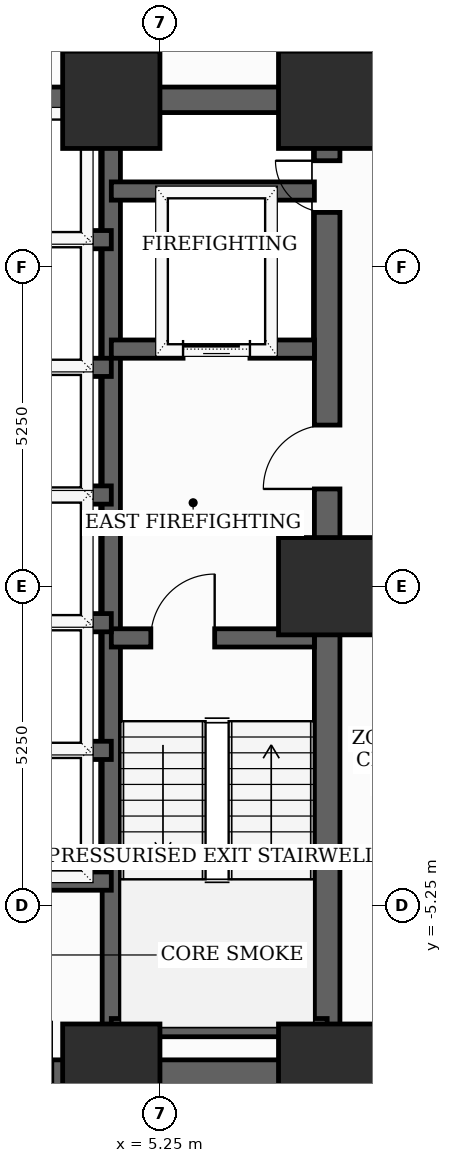
"""IFC4 building model, lengths in metres.
Left out: names, types, materials, properties, quantities, classifications, styles, units other than length and angle.
Written with IfcOpenShell. Run it as: python <this file> out.ifc"""

import sys

from ifc_helpers import new_model, si_unit, direction, frame, frame_2d, origin, origin_2d, place, context, subcontext, project, spatial, rectangle, extrude, element, fill, save


model = new_model("IFC4")
c1 = context("Model", 3, precision=1e-05, world=origin(), true_north=direction((0.0, 1.0)))
c2 = subcontext(c1, "Body", "Model", "MODEL_VIEW")
j1 = project(units=[si_unit("LENGTHUNIT", "METRE"), si_unit("PLANEANGLEUNIT", "RADIAN")], contexts=[c1])
p1 = place(None, origin())
s1 = spatial("IfcSite", under=j1, at=p1, CompositionType="ELEMENT")
p2 = place(p1, origin())
s2 = spatial("IfcBuilding", under=s1, at=p2, CompositionType="ELEMENT")
p3 = place(p2, frame((0.0, 0.0, 81.5)))
s3 = spatial("IfcBuildingStorey", under=s2, at=p3, CompositionType="ELEMENT", Elevation=81.5)
for number, where, z_axis, x_axis in (
    (1, (4.45, -8.0, 0.0), (0.0, 0.0, 1.0), (1.0, 0.0, 0.0)),
    (2, (8.0, -8.0, 0.0), (0.0, 0.0, 1.0), (1.0, 0.0, 0.0)),
    (3, (8.0, 0.0, 0.0), (0.0, 0.0, 1.0), (1.0, 0.0, 0.0)),
    (4, (8.0, 8.0, 0.0), (0.0, 0.0, 1.0), (1.0, 0.0, 0.0)),
    (5, (4.45, 8.0, 0.0), (0.0, 0.0, 1.0), (1.0, 0.0, 0.0)),
):
    element("IfcColumn", number, at=place(p3, frame(where, z_axis=z_axis, x_axis=x_axis)), inside=s3, PredefinedType="COLUMN", context=c2, shape_type="SweptSolid", body=[
        extrude(rectangle(XDim=1.6, YDim=1.6, at=origin_2d()), origin(), (0.0, 0.0, 1.0), 3.7),
    ])
p4 = place(p3, frame((8.0, -8.0, 0.0), z_axis=(0.0, 0.0, 1.0), x_axis=(0.0, 1.0, 0.0)))
e6 = element("IfcWall", 6, at=p4, inside=s3, PredefinedType="SHEAR", context=c2, shape_type="SweptSolid", body=[
    extrude(rectangle(XDim=16.0, YDim=0.42, at=frame_2d((8.0, 0.0))), origin(), (0.0, 0.0, 1.0), 3.46),
])
p5 = place(p4, frame((9.6, 0.0, 0.0)))
e7 = element("IfcOpeningElement", 7, at=p5, cuts=e6, PredefinedType="OPENING", context=c2, shape_type="SweptSolid", body=[
    extrude(rectangle(XDim=1.05, YDim=2.15, at=frame_2d((0.525, 1.075))), frame((0.0, 0.22, 0.0), z_axis=(0.0, -1.0, 0.0), x_axis=(1.0, 0.0, 0.0)), (0.0, 0.0, 1.0), 0.44),
])
p6 = place(p4, frame((14.148, 0.0, 0.0)))
e8 = element("IfcOpeningElement", 8, at=p6, cuts=e6, PredefinedType="OPENING", context=c2, shape_type="SweptSolid", body=[
    extrude(rectangle(XDim=0.85, YDim=2.02, at=frame_2d((0.425, 1.01))), frame((0.0, 0.22, 0.0), z_axis=(0.0, -1.0, 0.0), x_axis=(1.0, 0.0, 0.0)), (0.0, 0.0, 1.0), 0.44),
])
p7 = place(p3, frame((-8.0, -8.0, 0.0), z_axis=(0.0, 0.0, 1.0), x_axis=(1.0, 0.0, 0.0)))
e9 = element("IfcWall", 9, at=p7, inside=s3, PredefinedType="SHEAR", context=c2, shape_type="SweptSolid", body=[
    extrude(rectangle(XDim=16.0, YDim=0.42, at=frame_2d((8.0, 0.0))), origin(), (0.0, 0.0, 1.0), 3.46),
])
p8 = place(p7, frame((4.529, 0.0, 0.0)))
e10 = element("IfcOpeningElement", 10, at=p8, cuts=e9, PredefinedType="OPENING", context=c2, shape_type="SweptSolid", body=[
    extrude(rectangle(XDim=0.85, YDim=2.02, at=frame_2d((0.425, 1.01))), frame((0.0, 0.22, 0.0), z_axis=(0.0, -1.0, 0.0), x_axis=(1.0, 0.0, 0.0)), (0.0, 0.0, 1.0), 0.44),
])
p9 = place(p7, frame((6.49, 0.0, 0.0)))
e11 = element("IfcOpeningElement", 11, at=p9, cuts=e9, PredefinedType="OPENING", context=c2, shape_type="SweptSolid", body=[
    extrude(rectangle(XDim=0.85, YDim=2.02, at=frame_2d((0.425, 1.01))), frame((0.0, 0.22, 0.0), z_axis=(0.0, -1.0, 0.0), x_axis=(1.0, 0.0, 0.0)), (0.0, 0.0, 1.0), 0.44),
])
p10 = place(p7, frame((8.69, 0.0, 0.0)))
e12 = element("IfcOpeningElement", 12, at=p10, cuts=e9, PredefinedType="OPENING", context=c2, shape_type="SweptSolid", body=[
    extrude(rectangle(XDim=0.85, YDim=2.02, at=frame_2d((0.425, 1.01))), frame((0.0, 0.22, 0.0), z_axis=(0.0, -1.0, 0.0), x_axis=(1.0, 0.0, 0.0)), (0.0, 0.0, 1.0), 0.44),
])
p11 = place(p7, frame((10.621, 0.0, 0.0)))
e13 = element("IfcOpeningElement", 13, at=p11, cuts=e9, PredefinedType="OPENING", context=c2, shape_type="SweptSolid", body=[
    extrude(rectangle(XDim=0.85, YDim=2.02, at=frame_2d((0.425, 1.01))), frame((0.0, 0.22, 0.0), z_axis=(0.0, -1.0, 0.0), x_axis=(1.0, 0.0, 0.0)), (0.0, 0.0, 1.0), 0.44),
])
p12 = place(p3, frame((-8.0, 8.0, 0.0), z_axis=(0.0, 0.0, 1.0), x_axis=(1.0, 0.0, 0.0)))
e14 = element("IfcWall", 14, at=p12, inside=s3, PredefinedType="SHEAR", context=c2, shape_type="SweptSolid", body=[
    extrude(rectangle(XDim=16.0, YDim=0.42, at=frame_2d((8.0, 0.0))), origin(), (0.0, 0.0, 1.0), 3.46),
])
p13 = place(p12, frame((7.1, 0.0, 0.0)))
e15 = element("IfcOpeningElement", 15, at=p13, cuts=e14, PredefinedType="OPENING", context=c2, shape_type="SweptSolid", body=[
    extrude(rectangle(XDim=1.8, YDim=2.15, at=frame_2d((0.9, 1.075))), frame((0.0, 0.22, 0.0), z_axis=(0.0, -1.0, 0.0), x_axis=(1.0, 0.0, 0.0)), (0.0, 0.0, 1.0), 0.44),
])
p14 = place(p3, frame((4.45, -7.79, 0.0), z_axis=(0.0, 0.0, 1.0), x_axis=(0.0, 1.0, 0.0)))
e16 = element("IfcWall", 16, at=p14, inside=s3, PredefinedType="SHEAR", context=c2, shape_type="SweptSolid", body=[
    extrude(rectangle(XDim=15.58, YDim=0.3, at=frame_2d((7.79, 0.0))), origin(), (0.0, 0.0, 1.0), 3.46),
])
p15 = place(p3, frame((4.45, -0.85, 0.0), z_axis=(0.0, 0.0, 1.0), x_axis=(1.0, 0.0, 0.0)))
e17 = element("IfcWall", 17, at=p15, inside=s3, PredefinedType="SHEAR", context=c2, shape_type="SweptSolid", body=[
    extrude(rectangle(XDim=3.34, YDim=0.3, at=frame_2d((1.67, 0.0))), origin(), (0.0, 0.0, 1.0), 3.46),
])
p16 = place(p15, frame((0.65, 0.0, 0.0)))
e18 = element("IfcOpeningElement", 18, at=p16, cuts=e17, PredefinedType="OPENING", context=c2, shape_type="SweptSolid", body=[
    extrude(rectangle(XDim=1.05, YDim=2.15, at=frame_2d((0.525, 1.075))), frame((0.0, 0.16, 0.0), z_axis=(0.0, -1.0, 0.0), x_axis=(1.0, 0.0, 0.0)), (0.0, 0.0, 1.0), 0.32),
])
p17 = place(p3, frame((4.45, -7.26, 0.0), z_axis=(0.0, 0.0, 1.0), x_axis=(1.0, 0.0, 0.0)))
e19 = element("IfcWall", 19, at=p17, inside=s3, PredefinedType="SHEAR", context=c2, shape_type="SweptSolid", body=[
    extrude(rectangle(XDim=3.55, YDim=0.3, at=frame_2d((1.775, 0.0))), origin(), (0.0, 0.0, 1.0), 3.46),
])
p18 = place(p3, frame((4.45, 3.9, 0.0), z_axis=(0.0, 0.0, 1.0), x_axis=(1.0, 0.0, 0.0)))
e20 = element("IfcWall", 20, at=p18, inside=s3, PredefinedType="SHEAR", context=c2, shape_type="SweptSolid", body=[
    extrude(rectangle(XDim=3.34, YDim=0.3, at=frame_2d((1.67, 0.0))), origin(), (0.0, 0.0, 1.0), 3.46),
])
p19 = place(p18, frame((1.18, 0.0, 0.0)))
e21 = element("IfcOpeningElement", 21, at=p19, cuts=e20, PredefinedType="OPENING", context=c2, shape_type="SweptSolid", body=[
    extrude(rectangle(XDim=1.1, YDim=2.1, at=frame_2d((0.55, 1.05))), frame((0.0, 0.16, 0.0), z_axis=(0.0, -1.0, 0.0), x_axis=(1.0, 0.0, 0.0)), (0.0, 0.0, 1.0), 0.32),
])
p20 = place(p3, frame((4.45, 6.5, 0.0), z_axis=(0.0, 0.0, 1.0), x_axis=(1.0, 0.0, 0.0)))
e22 = element("IfcWall", 22, at=p20, inside=s3, PredefinedType="SHEAR", context=c2, shape_type="SweptSolid", body=[
    extrude(rectangle(XDim=3.34, YDim=0.3, at=frame_2d((1.67, 0.0))), origin(), (0.0, 0.0, 1.0), 3.46),
])
p21 = place(p3, frame((-4.45, -4.85, 0.0), z_axis=(0.0, 0.0, 1.0), x_axis=(1.0, 0.0, 0.0)))
e23 = element("IfcWall", 23, at=p21, inside=s3, PredefinedType="SHEAR", context=c2, shape_type="SweptSolid", body=[
    extrude(rectangle(XDim=8.9, YDim=0.3, at=frame_2d((4.45, 0.0))), origin(), (0.0, 0.0, 1.0), 3.46),
])
for number, where, z_axis, x_axis in (
    (24, (1.68, 1.5, 0.0), (0.0, 0.0, 1.0), (1.0, 0.0, 0.0)),
    (25, (1.68, 3.6, 0.0), (0.0, 0.0, 1.0), (1.0, 0.0, 0.0)),
    (26, (1.68, 5.7, 0.0), (0.0, 0.0, 1.0), (1.0, 0.0, 0.0)),
    (27, (1.68, -2.7, 0.0), (0.0, 0.0, 1.0), (1.0, 0.0, 0.0)),
    (28, (1.68, -0.6, 0.0), (0.0, 0.0, 1.0), (1.0, 0.0, 0.0)),
):
    element("IfcWall", number, at=place(p3, frame(where, z_axis=z_axis, x_axis=x_axis)), inside=s3, PredefinedType="SHEAR", context=c2, shape_type="SweptSolid", body=[
        extrude(rectangle(XDim=2.77, YDim=0.3, at=frame_2d((1.385, 0.0))), origin(), (0.0, 0.0, 1.0), 3.46),
    ])
p22 = place(p5, origin())
e29 = element("IfcDoor", 29, at=p22, inside=s3, OperationType="SINGLE_SWING_LEFT", PredefinedType="DOOR", context=c2, shape_type="SweptSolid", body=[
    extrude(rectangle(XDim=1.05, YDim=2.15, at=frame_2d((0.525, 1.075))), frame((0.0, 0.025, 0.0), z_axis=(0.0, -1.0, 0.0), x_axis=(1.0, 0.0, 0.0)), (0.0, 0.0, 1.0), 0.05),
])
fill(e7, e29)
p23 = place(p6, origin())
e30 = element("IfcDoor", 30, at=p23, inside=s3, OperationType="SINGLE_SWING_RIGHT", PredefinedType="TRAPDOOR", context=c2, shape_type="SweptSolid", body=[
    extrude(rectangle(XDim=0.85, YDim=2.02, at=frame_2d((0.425, 1.01))), frame((0.0, 0.025, 0.0), z_axis=(0.0, -1.0, 0.0), x_axis=(1.0, 0.0, 0.0)), (0.0, 0.0, 1.0), 0.05),
])
fill(e8, e30)
p24 = place(p16, origin())
e31 = element("IfcDoor", 31, at=p24, inside=s3, OperationType="SINGLE_SWING_RIGHT", PredefinedType="DOOR", context=c2, shape_type="SweptSolid", body=[
    extrude(rectangle(XDim=1.05, YDim=2.15, at=frame_2d((0.525, 1.075))), frame((0.0, 0.025, 0.0), z_axis=(0.0, -1.0, 0.0), x_axis=(1.0, 0.0, 0.0)), (0.0, 0.0, 1.0), 0.05),
])
fill(e18, e31)
p25 = place(p19, origin())
e32 = element("IfcDoor", 32, at=p25, inside=s3, OperationType="SLIDING_TO_LEFT", PredefinedType="DOOR", context=c2, shape_type="SweptSolid", body=[
    extrude(rectangle(XDim=1.1, YDim=2.1, at=frame_2d((0.55, 1.05))), frame((0.0, 0.025, 0.0), z_axis=(0.0, -1.0, 0.0), x_axis=(1.0, 0.0, 0.0)), (0.0, 0.0, 1.0), 0.05),
])
fill(e21, e32)
save(model, sys.argv[1])
